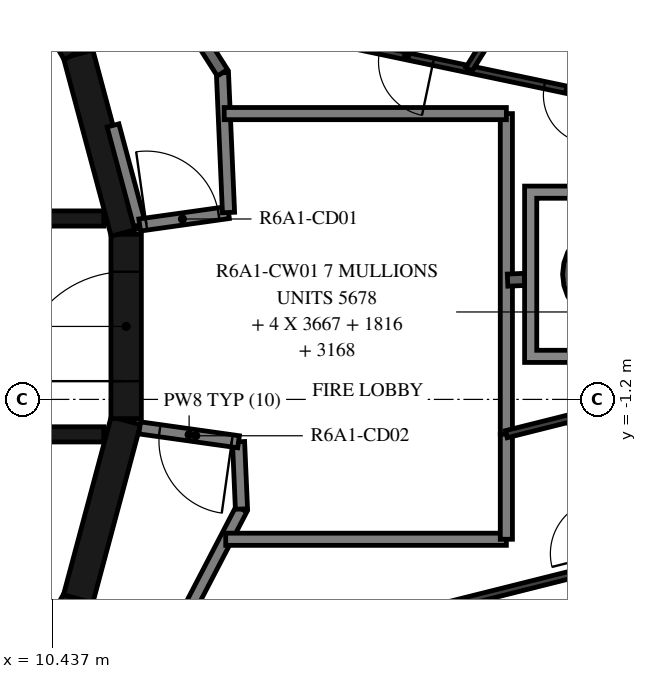
"""IFC4 building model, lengths in metres.
Left out: names, types, materials, properties, quantities, classifications, styles, units other than length and angle.
Written with IfcOpenShell. Run it as: python <this file> out.ifc"""

import sys

from ifc_helpers import new_model, si_unit, direction, frame, frame_2d, origin, origin_2d, place, context, subcontext, project, spatial, polyline, rectangle, hollow_circle, outline, extrude, element, fill, save


model = new_model("IFC4")
c1 = context("Model", 3, precision=1e-05, world=origin(), true_north=direction((0.0, 1.0)))
c2 = subcontext(c1, "Body", "Model", "MODEL_VIEW")
j1 = project(units=[si_unit("LENGTHUNIT", "METRE"), si_unit("PLANEANGLEUNIT", "RADIAN")], contexts=[c1])
p1 = place(None, origin())
s1 = spatial("IfcSite", under=j1, at=p1, CompositionType="ELEMENT")
p2 = place(p1, origin())
s2 = spatial("IfcBuilding", under=s1, at=p2, CompositionType="ELEMENT")
p3 = place(p2, frame((0.0, 0.0, 230.2)))
s3 = spatial("IfcBuildingStorey", under=s2, at=p3, CompositionType="ELEMENT", Elevation=230.2)
p4 = place(p3, frame((19.65, 0.858, -0.38), z_axis=(0.0, 0.0, 1.0), x_axis=(1.0, 0.0, 0.0)))
e1 = element("IfcColumn", 1, at=p4, inside=s3, PredefinedType="COLUMN", context=c2, shape_type="SweptSolid", body=[
    extrude(hollow_circle(Radius=0.825, WallThickness=0.04, at=origin_2d()), origin(), (0.0, 0.0, 1.0), 3.5),
])
for number, where, z_axis, x_axis in (
    (2, (9.329, -7.137, 0.0), (0.0, 0.0, 1.0), (0.5, 0.866, 0.0)),
    (3, (10.858, -4.479, 0.0), (0.0, 0.0, 1.0), (0.259, 0.966, 0.0)),
):
    element("IfcWall", number, at=place(p3, frame(where, z_axis=z_axis, x_axis=x_axis)), inside=s3, PredefinedType="SHEAR", context=c2, shape_type="SweptSolid", body=[
        extrude(rectangle(XDim=3.033, YDim=0.5, at=frame_2d((1.516, 0.0))), origin(), (0.0, 0.0, 1.0), 3.12),
    ])
p5 = place(p3, frame((11.647, -1.516, 0.0), z_axis=(0.0, 0.0, 1.0), x_axis=(0.0, 1.0, 0.0)))
e4 = element("IfcWall", 4, at=p5, inside=s3, PredefinedType="SHEAR", context=c2, shape_type="SweptSolid", body=[
    extrude(rectangle(XDim=3.033, YDim=0.5, at=frame_2d((1.516, 0.0))), origin(), (0.0, 0.0, 1.0), 3.12),
])
p6 = place(p5, frame((0.616, 0.0, 0.0)))
e5 = element("IfcOpeningElement", 5, at=p6, cuts=e4, PredefinedType="OPENING", context=c2, shape_type="SweptSolid", body=[
    extrude(rectangle(XDim=1.8, YDim=2.1, at=frame_2d((0.9, 1.05))), frame((0.0, 0.26, 0.0), z_axis=(0.0, -1.0, 0.0), x_axis=(1.0, 0.0, 0.0)), (0.0, 0.0, 1.0), 0.52),
])
for number, where, z_axis, x_axis in (
    (6, (11.643, 1.55, 0.0), (0.0, 0.0, 1.0), (-0.259, 0.966, 0.0)),
    (7, (10.845, 4.51, 0.0), (0.0, 0.0, 1.0), (-0.5, 0.866, 0.0)),
):
    element("IfcWall", number, at=place(p3, frame(where, z_axis=z_axis, x_axis=x_axis)), inside=s3, PredefinedType="SHEAR", context=c2, shape_type="SweptSolid", body=[
        extrude(rectangle(XDim=3.033, YDim=0.5, at=frame_2d((1.516, 0.0))), origin(), (0.0, 0.0, 1.0), 3.12),
    ])
p7 = place(p3, frame((3.35, 1.775, 0.0), z_axis=(0.0, 0.0, 1.0), x_axis=(1.0, 0.0, 0.0)))
e8 = element("IfcWall", 8, at=p7, inside=s3, PredefinedType="SHEAR", context=c2, shape_type="SweptSolid", body=[
    extrude(rectangle(XDim=7.93, YDim=0.25, at=frame_2d((3.965, 0.0))), origin(), (0.0, 0.0, 1.0), 3.12),
])
p8 = place(p7, frame((0.35, 0.0, 0.0)))
e9 = element("IfcOpeningElement", 9, at=p8, cuts=e8, PredefinedType="OPENING", context=c2, shape_type="SweptSolid", body=[
    extrude(rectangle(XDim=1.2, YDim=2.4, at=frame_2d((0.6, 1.2))), frame((0.0, 0.135, 0.0), z_axis=(0.0, -1.0, 0.0), x_axis=(1.0, 0.0, 0.0)), (0.0, 0.0, 1.0), 0.27),
])
p9 = place(p7, frame((2.5, 0.0, 0.0)))
e10 = element("IfcOpeningElement", 10, at=p9, cuts=e8, PredefinedType="OPENING", context=c2, shape_type="SweptSolid", body=[
    extrude(rectangle(XDim=1.2, YDim=2.4, at=frame_2d((0.6, 1.2))), frame((0.0, 0.135, 0.0), z_axis=(0.0, -1.0, 0.0), x_axis=(1.0, 0.0, 0.0)), (0.0, 0.0, 1.0), 0.27),
])
p10 = place(p7, frame((4.8, 0.0, 0.0)))
e11 = element("IfcOpeningElement", 11, at=p10, cuts=e8, PredefinedType="OPENING", context=c2, shape_type="SweptSolid", body=[
    extrude(rectangle(XDim=0.9, YDim=2.1, at=frame_2d((0.45, 1.05))), frame((0.0, 0.135, 0.0), z_axis=(0.0, -1.0, 0.0), x_axis=(1.0, 0.0, 0.0)), (0.0, 0.0, 1.0), 0.27),
])
p11 = place(p3, frame((3.35, -1.775, 0.0), z_axis=(0.0, 0.0, 1.0), x_axis=(1.0, 0.0, 0.0)))
e12 = element("IfcWall", 12, at=p11, inside=s3, PredefinedType="SHEAR", context=c2, shape_type="SweptSolid", body=[
    extrude(rectangle(XDim=7.93, YDim=0.25, at=frame_2d((3.965, 0.0))), origin(), (0.0, 0.0, 1.0), 3.12),
])
p12 = place(p11, frame((0.4, 0.0, 0.0)))
e13 = element("IfcOpeningElement", 13, at=p12, cuts=e12, PredefinedType="OPENING", context=c2, shape_type="SweptSolid", body=[
    extrude(rectangle(XDim=1.1, YDim=2.4, at=frame_2d((0.55, 1.2))), frame((0.0, 0.135, 0.0), z_axis=(0.0, -1.0, 0.0), x_axis=(1.0, 0.0, 0.0)), (0.0, 0.0, 1.0), 0.27),
])
p13 = place(p11, frame((2.55, 0.0, 0.0)))
e14 = element("IfcOpeningElement", 14, at=p13, cuts=e12, PredefinedType="OPENING", context=c2, shape_type="SweptSolid", body=[
    extrude(rectangle(XDim=1.1, YDim=2.4, at=frame_2d((0.55, 1.2))), frame((0.0, 0.135, 0.0), z_axis=(0.0, -1.0, 0.0), x_axis=(1.0, 0.0, 0.0)), (0.0, 0.0, 1.0), 0.27),
])
p14 = place(p11, frame((4.7, 0.0, 0.0)))
e15 = element("IfcOpeningElement", 15, at=p14, cuts=e12, PredefinedType="OPENING", context=c2, shape_type="SweptSolid", body=[
    extrude(rectangle(XDim=1.1, YDim=2.4, at=frame_2d((0.55, 1.2))), frame((0.0, 0.135, 0.0), z_axis=(0.0, -1.0, 0.0), x_axis=(1.0, 0.0, 0.0)), (0.0, 0.0, 1.0), 0.27),
])
p15 = place(p3, frame((11.87, 1.668, 0.0), z_axis=(0.0, 0.0, 1.0), x_axis=(-0.258836880648, 0.965921047093, 0.0)))
e16 = element("IfcWall", 16, at=p15, inside=s3, PredefinedType="STANDARD", context=c2, shape_type="SweptSolid", body=[
    extrude(rectangle(XDim=1.695, YDim=0.2, at=frame_2d((0.848, 0.0))), origin(), (0.0, 0.0, 1.0), 3.12),
])
p16 = place(p3, frame((11.87, 1.668, 0.0), z_axis=(0.0, 0.0, 1.0), x_axis=(0.990267985606, 0.139173692496, 0.0)))
e17 = element("IfcWall", 17, at=p16, inside=s3, PredefinedType="STANDARD", context=c2, shape_type="SweptSolid", body=[
    extrude(rectangle(XDim=1.475, YDim=0.2, at=frame_2d((0.738, 0.0))), origin(), (0.0, 0.0, 1.0), 3.12),
])
p17 = place(p16, frame((0.11, 0.0, 0.0)))
e18 = element("IfcOpeningElement", 18, at=p17, cuts=e17, PredefinedType="OPENING", context=c2, shape_type="SweptSolid", body=[
    extrude(rectangle(XDim=1.2, YDim=2.1, at=frame_2d((0.6, 1.05))), frame((0.0, 0.11, 0.0), z_axis=(0.0, -1.0, 0.0), x_axis=(1.0, 0.0, 0.0)), (0.0, 0.0, 1.0), 0.22),
])
p18 = place(p3, frame((13.331, 1.874, 0.0), z_axis=(0.0, 0.0, 1.0), x_axis=(-0.043621457762, 0.999048131184, 0.0)))
e19 = element("IfcWall", 19, at=p18, inside=s3, PredefinedType="STANDARD", context=c2, shape_type="SweptSolid", body=[
    extrude(rectangle(XDim=2.3, YDim=0.2, at=frame_2d((1.15, 0.0))), origin(), (0.0, 0.0, 1.0), 3.12),
])
p19 = place(p3, frame((13.231, 4.172, 0.0), z_axis=(0.0, 0.0, 1.0), x_axis=(-0.537304397561, 0.843388394728, 0.0)))
e20 = element("IfcWall", 20, at=p19, inside=s3, PredefinedType="STANDARD", context=c2, shape_type="SweptSolid", body=[
    extrude(rectangle(XDim=7.181, YDim=0.2, at=frame_2d((3.59, 0.0))), origin(), (0.0, 0.0, 1.0), 3.12),
])
p20 = place(p19, frame((2.881, 0.0, 0.0)))
e21 = element("IfcOpeningElement", 21, at=p20, cuts=e20, PredefinedType="OPENING", context=c2, shape_type="SweptSolid", body=[
    extrude(rectangle(XDim=1.0, YDim=2.1, at=frame_2d((0.5, 1.05))), frame((0.0, 0.11, 0.0), z_axis=(0.0, -1.0, 0.0), x_axis=(1.0, 0.0, 0.0)), (0.0, 0.0, 1.0), 0.22),
])
p21 = place(p19, frame((5.681, 0.0, 0.0)))
e22 = element("IfcOpeningElement", 22, at=p21, cuts=e20, PredefinedType="OPENING", context=c2, shape_type="SweptSolid", body=[
    extrude(rectangle(XDim=1.0, YDim=2.1, at=frame_2d((0.5, 1.05))), frame((0.0, 0.11, 0.0), z_axis=(0.0, -1.0, 0.0), x_axis=(1.0, 0.0, 0.0)), (0.0, 0.0, 1.0), 0.22),
])
p22 = place(p3, frame((10.228, -9.372, 0.0), z_axis=(0.0, 0.0, 1.0), x_axis=(0.461759464021, 0.887005184532, 0.0)))
e23 = element("IfcWall", 23, at=p22, inside=s3, PredefinedType="STANDARD", context=c2, shape_type="SweptSolid", body=[
    extrude(rectangle(XDim=7.181, YDim=0.2, at=frame_2d((3.591, 0.0))), origin(), (0.0, 0.0, 1.0), 3.12),
])
p23 = place(p3, frame((13.544, -3.003, 0.0), z_axis=(0.0, 0.0, 1.0), x_axis=(-0.043666917606, 0.999046145234, 0.0)))
e24 = element("IfcWall", 24, at=p23, inside=s3, PredefinedType="STANDARD", context=c2, shape_type="SweptSolid", body=[
    extrude(rectangle(XDim=1.107, YDim=0.2, at=frame_2d((0.553, 0.0))), origin(), (0.0, 0.0, 1.0), 3.12),
])
p24 = place(p3, frame((13.496, -1.897, 0.0), z_axis=(0.0, 0.0, 1.0), x_axis=(-0.99026234641, 0.139213811391, 0.0)))
e25 = element("IfcWall", 25, at=p24, inside=s3, PredefinedType="STANDARD", context=c2, shape_type="SweptSolid", body=[
    extrude(rectangle(XDim=1.641, YDim=0.2, at=frame_2d((0.821, 0.0))), origin(), (0.0, 0.0, 1.0), 3.12),
])
p25 = place(p24, frame((0.11, 0.0, 0.0)))
e26 = element("IfcOpeningElement", 26, at=p25, cuts=e25, PredefinedType="OPENING", context=c2, shape_type="SweptSolid", body=[
    extrude(rectangle(XDim=1.2, YDim=2.1, at=frame_2d((0.6, 1.05))), frame((0.0, 0.11, 0.0), z_axis=(0.0, -1.0, 0.0), x_axis=(1.0, 0.0, 0.0)), (0.0, 0.0, 1.0), 0.22),
])
p26 = place(p3, frame((17.9, -1.772, 0.0), z_axis=(0.0, 0.0, 1.0), x_axis=(0.0, 1.0, 0.0)))
e27 = element("IfcWall", 27, at=p26, inside=s3, PredefinedType="STANDARD", context=c2, shape_type="SweptSolid", body=[
    extrude(rectangle(XDim=5.272, YDim=0.2, at=frame_2d((2.636, 0.0))), origin(), (0.0, 0.0, 1.0), 3.12),
])
p27 = place(p3, frame((17.9, 3.5, 0.0), z_axis=(0.0, 0.0, 1.0), x_axis=(-1.0, 0.0, 0.0)))
e28 = element("IfcWall", 28, at=p27, inside=s3, PredefinedType="STANDARD", context=c2, shape_type="SweptSolid", body=[
    extrude(rectangle(XDim=4.64, YDim=0.2, at=frame_2d((2.32, 0.0))), origin(), (0.0, 0.0, 1.0), 3.12),
])
p28 = place(p3, frame((13.285, -3.5, 0.0), z_axis=(0.0, 0.0, 1.0), x_axis=(1.0, 0.0, 0.0)))
e29 = element("IfcWall", 29, at=p28, inside=s3, PredefinedType="STANDARD", context=c2, shape_type="SweptSolid", body=[
    extrude(rectangle(XDim=4.615, YDim=0.2, at=frame_2d((2.308, 0.0))), origin(), (0.0, 0.0, 1.0), 3.12),
])
p29 = place(p3, frame((17.9, -3.5, 0.0), z_axis=(0.0, 0.0, 1.0), x_axis=(0.0, 1.0, 0.0)))
e30 = element("IfcWall", 30, at=p29, inside=s3, PredefinedType="STANDARD", context=c2, shape_type="SweptSolid", body=[
    extrude(rectangle(XDim=1.728, YDim=0.2, at=frame_2d((0.864, 0.0))), origin(), (0.0, 0.0, 1.0), 3.12),
])
p30 = place(p3, frame((17.92, 0.761, 0.0), z_axis=(0.0, 0.0, 1.0), x_axis=(0.999051221661, 0.04355061995, 0.0)))
e31 = element("IfcWall", 31, at=p30, inside=s3, PredefinedType="STANDARD", context=c2, shape_type="SweptSolid", body=[
    extrude(rectangle(XDim=0.28, YDim=0.2, at=frame_2d((0.14, 0.0))), origin(), (0.0, 0.0, 1.0), 3.12),
])
p31 = place(p3, frame((19.505, 3.763, 0.0), z_axis=(0.0, 0.0, 1.0), x_axis=(-0.978660081285, 0.205485876157, 0.0)))
e32 = element("IfcWall", 32, at=p31, inside=s3, PredefinedType="PARTITIONING", context=c2, shape_type="SweptSolid", body=[
    extrude(rectangle(XDim=4.996, YDim=0.12, at=frame_2d((2.498, 0.0))), origin(), (0.0, 0.0, 1.0), 3.12),
])
p32 = place(p31, frame((0.2, 0.0, 0.0)))
e33 = element("IfcOpeningElement", 33, at=p32, cuts=e32, PredefinedType="OPENING", context=c2, shape_type="SweptSolid", body=[
    extrude(rectangle(XDim=0.8, YDim=2.1, at=frame_2d((0.4, 1.05))), frame((0.0, 0.07, 0.0), z_axis=(0.0, -1.0, 0.0), x_axis=(1.0, 0.0, 0.0)), (0.0, 0.0, 1.0), 0.14),
])
p33 = place(p31, frame((2.869, 0.0, 0.0)))
e34 = element("IfcOpeningElement", 34, at=p33, cuts=e32, PredefinedType="OPENING", context=c2, shape_type="SweptSolid", body=[
    extrude(rectangle(XDim=0.9, YDim=2.1, at=frame_2d((0.45, 1.05))), frame((0.0, 0.07, 0.0), z_axis=(0.0, -1.0, 0.0), x_axis=(1.0, 0.0, 0.0)), (0.0, 0.0, 1.0), 0.14),
])
p34 = place(p3, frame((18.189, 5.677, 0.0), z_axis=(0.0, 0.0, 1.0), x_axis=(-0.529639004581, -0.848223157445, 0.0)))
e35 = element("IfcWall", 35, at=p34, inside=s3, PredefinedType="PARTITIONING", context=c2, shape_type="SweptSolid", body=[
    extrude(rectangle(XDim=1.707, YDim=0.12, at=frame_2d((0.854, 0.0))), origin(), (0.0, 0.0, 1.0), 3.12),
])
p35 = place(p3, frame((21.085, 4.169, 0.0), z_axis=(0.0, 0.0, 1.0), x_axis=(-0.887017373034, 0.461736050071, 0.0)))
e36 = element("IfcWall", 36, at=p35, inside=s3, PredefinedType="PARTITIONING", context=c2, shape_type="SweptSolid", body=[
    extrude(rectangle(XDim=10.247, YDim=0.12, at=frame_2d((5.123, 0.0))), origin(), (0.0, 0.0, 1.0), 3.12),
])
p36 = place(p35, frame((3.425, 0.0, 0.0)))
e37 = element("IfcOpeningElement", 37, at=p36, cuts=e36, PredefinedType="OPENING", context=c2, shape_type="SweptSolid", body=[
    extrude(rectangle(XDim=0.9, YDim=2.1, at=frame_2d((0.45, 1.05))), frame((0.0, 0.07, 0.0), z_axis=(0.0, -1.0, 0.0), x_axis=(1.0, 0.0, 0.0)), (0.0, 0.0, 1.0), 0.14),
])
p37 = place(p3, frame((14.029, -5.32, 0.0), z_axis=(0.0, 0.0, 1.0), x_axis=(0.969999099814, 0.243108507378, 0.0)))
e38 = element("IfcWall", 38, at=p37, inside=s3, PredefinedType="PARTITIONING", context=c2, shape_type="SweptSolid", body=[
    extrude(rectangle(XDim=5.715, YDim=0.12, at=frame_2d((2.857, 0.0))), origin(), (0.0, 0.0, 1.0), 3.12),
])
p38 = place(p3, frame((18.965, -1.505, 0.0), z_axis=(0.0, 0.0, 1.0), x_axis=(-0.969998406835, -0.243111272339, 0.0)))
e39 = element("IfcWall", 39, at=p38, inside=s3, PredefinedType="PARTITIONING", context=c2, shape_type="SweptSolid", body=[
    extrude(rectangle(XDim=1.098, YDim=0.12, at=frame_2d((0.549, 0.0))), origin(), (0.0, 0.0, 1.0), 3.12),
])
p39 = place(p3, origin())
e40 = element("IfcWall", 40, at=p39, inside=s3, PredefinedType="STANDARD", context=c2, shape_type="SweptSolid", body=[
    extrude(outline(polyline([(21.1, 2.308), (21.1, -0.592), (18.2, -0.592), (18.2, 2.308), (21.1, 2.308)]), holes=[polyline([(18.4, -0.392), (20.9, -0.392), (20.9, 2.108), (18.4, 2.108), (18.4, -0.392)])]), origin(), (0.0, 0.0, 1.0), 3.12),
])
p40 = place(p6, origin())
e41 = element("IfcDoor", 41, at=p40, inside=s3, OperationType="DOUBLE_DOOR_SINGLE_SWING", PredefinedType="DOOR", context=c2, shape_type="SweptSolid", body=[
    extrude(rectangle(XDim=1.8, YDim=2.1, at=frame_2d((0.9, 1.05))), frame((0.0, 0.025, 0.0), z_axis=(0.0, -1.0, 0.0), x_axis=(1.0, 0.0, 0.0)), (0.0, 0.0, 1.0), 0.05),
])
fill(e5, e41)
p41 = place(p32, origin())
e42 = element("IfcDoor", 42, at=p41, inside=s3, OperationType="SINGLE_SWING_LEFT", PredefinedType="DOOR", context=c2, shape_type="SweptSolid", body=[
    extrude(rectangle(XDim=0.8, YDim=2.1, at=frame_2d((0.4, 1.05))), frame((0.0, 0.025, 0.0), z_axis=(0.0, -1.0, 0.0), x_axis=(1.0, 0.0, 0.0)), (0.0, 0.0, 1.0), 0.05),
])
fill(e33, e42)
p42 = place(p33, origin())
e43 = element("IfcDoor", 43, at=p42, inside=s3, OperationType="SINGLE_SWING_LEFT", PredefinedType="DOOR", context=c2, shape_type="SweptSolid", body=[
    extrude(rectangle(XDim=0.9, YDim=2.1, at=frame_2d((0.45, 1.05))), frame((0.0, 0.025, 0.0), z_axis=(0.0, -1.0, 0.0), x_axis=(1.0, 0.0, 0.0)), (0.0, 0.0, 1.0), 0.05),
])
fill(e34, e43)
p43 = place(p17, origin())
e44 = element("IfcDoor", 44, at=p43, inside=s3, OperationType="DOUBLE_DOOR_SINGLE_SWING", PredefinedType="DOOR", context=c2, shape_type="SweptSolid", body=[
    extrude(rectangle(XDim=1.2, YDim=2.1, at=frame_2d((0.6, 1.05))), frame((0.0, 0.025, 0.0), z_axis=(0.0, -1.0, 0.0), x_axis=(1.0, 0.0, 0.0)), (0.0, 0.0, 1.0), 0.05),
])
fill(e18, e44)
p44 = place(p25, origin())
e45 = element("IfcDoor", 45, at=p44, inside=s3, OperationType="DOUBLE_DOOR_SINGLE_SWING", PredefinedType="DOOR", context=c2, shape_type="SweptSolid", body=[
    extrude(rectangle(XDim=1.2, YDim=2.1, at=frame_2d((0.6, 1.05))), frame((0.0, 0.025, 0.0), z_axis=(0.0, -1.0, 0.0), x_axis=(1.0, 0.0, 0.0)), (0.0, 0.0, 1.0), 0.05),
])
fill(e26, e45)
save(model, sys.argv[1])
